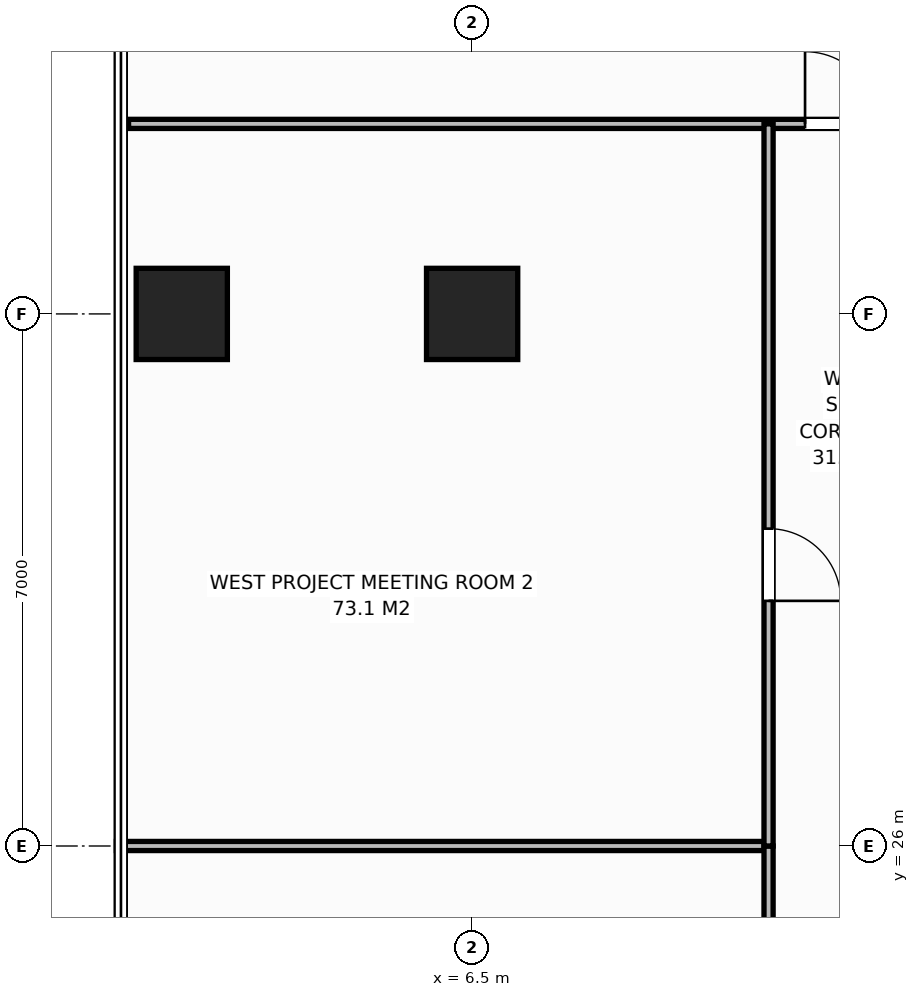
"""IFC4 building model, lengths in metres.
Left out: names, types, materials, properties, quantities, classifications, styles, units other than length and angle.
Written with IfcOpenShell. Run it as: python <this file> out.ifc"""

import sys

from ifc_helpers import new_model, si_unit, direction, frame, frame_2d, origin, origin_2d, place, context, subcontext, project, spatial, rectangle, extrude, element, fill, save


model = new_model("IFC4")
c1 = context("Model", 3, precision=1e-05, world=origin(), true_north=direction((0.0, 1.0)))
c2 = subcontext(c1, "Body", "Model", "MODEL_VIEW")
j1 = project(units=[si_unit("LENGTHUNIT", "METRE"), si_unit("PLANEANGLEUNIT", "RADIAN")], contexts=[c1])
p1 = place(None, origin())
s1 = spatial("IfcSite", under=j1, at=p1, CompositionType="ELEMENT")
p2 = place(p1, origin())
s2 = spatial("IfcBuilding", under=s1, at=p2, CompositionType="ELEMENT")
p3 = place(p2, frame((0.0, 0.0, 105.0)))
s3 = spatial("IfcBuildingStorey", under=s2, at=p3, CompositionType="ELEMENT", Elevation=105.0)
for number, where, z_axis, x_axis in (
    (1, (6.5, 33.0, 0.0), (0.0, 0.0, 1.0), (1.0, 0.0, 0.0)),
    (2, (2.68, 33.0, 0.0), (0.0, 0.0, 1.0), (1.0, 0.0, 0.0)),
):
    element("IfcColumn", number, at=place(p3, frame(where, z_axis=z_axis, x_axis=x_axis)), inside=s3, PredefinedType="COLUMN", context=c2, shape_type="SweptSolid", body=[
        extrude(rectangle(XDim=1.2, YDim=1.2, at=origin_2d()), origin(), (0.0, 0.0, 1.0), 3.8),
    ])
p4 = place(p3, frame((1.98, 35.5, 0.0), z_axis=(0.0, 0.0, 1.0), x_axis=(1.0, 0.0, 0.0)))
e3 = element("IfcWall", 3, at=p4, inside=s3, PredefinedType="PARTITIONING", context=c2, shape_type="SweptSolid", body=[
    extrude(rectangle(XDim=11.16, YDim=0.12, at=frame_2d((5.58, 0.0))), origin(), (0.0, 0.0, 1.0), 3.565),
])
p5 = place(p4, frame((8.9, 0.0, 0.0)))
e4 = element("IfcOpeningElement", 4, at=p5, cuts=e3, PredefinedType="OPENING", context=c2, shape_type="SweptSolid", body=[
    extrude(rectangle(XDim=0.95, YDim=2.15, at=frame_2d((0.475, 1.075))), frame((0.0, 0.07, 0.0), z_axis=(0.0, -1.0, 0.0), x_axis=(1.0, 0.0, 0.0)), (0.0, 0.0, 1.0), 0.14),
])
p6 = place(p3, frame((1.82, 26.0, 0.0), z_axis=(0.0, 0.0, 1.0), x_axis=(1.0, 0.0, 0.0)))
e5 = element("IfcWall", 5, at=p6, inside=s3, PredefinedType="PARTITIONING", context=c2, shape_type="SweptSolid", body=[
    extrude(rectangle(XDim=8.58, YDim=0.12, at=frame_2d((4.29, 0.0))), origin(), (0.0, 0.0, 1.0), 3.565),
])
p7 = place(p3, frame((10.4, 16.5, 0.0), z_axis=(0.0, 0.0, 1.0), x_axis=(0.0, 1.0, 0.0)))
e6 = element("IfcWall", 6, at=p7, inside=s3, PredefinedType="PARTITIONING", context=c2, shape_type="SweptSolid", body=[
    extrude(rectangle(XDim=9.5, YDim=0.12, at=frame_2d((4.75, 0.0))), origin(), (0.0, 0.0, 1.0), 3.565),
])
p8 = place(p7, frame((5.325, 0.0, 0.0)))
e7 = element("IfcOpeningElement", 7, at=p8, cuts=e6, PredefinedType="OPENING", context=c2, shape_type="SweptSolid", body=[
    extrude(rectangle(XDim=0.95, YDim=2.15, at=frame_2d((0.475, 1.075))), frame((0.0, 0.07, 0.0), z_axis=(0.0, -1.0, 0.0), x_axis=(1.0, 0.0, 0.0)), (0.0, 0.0, 1.0), 0.14),
])
p9 = place(p3, frame((10.4, 26.0, 0.0), z_axis=(0.0, 0.0, 1.0), x_axis=(0.0, 1.0, 0.0)))
e8 = element("IfcWall", 8, at=p9, inside=s3, PredefinedType="PARTITIONING", context=c2, shape_type="SweptSolid", body=[
    extrude(rectangle(XDim=9.5, YDim=0.12, at=frame_2d((4.75, 0.0))), origin(), (0.0, 0.0, 1.0), 3.565),
])
p10 = place(p9, frame((3.225, 0.0, 0.0)))
e9 = element("IfcOpeningElement", 9, at=p10, cuts=e8, PredefinedType="OPENING", context=c2, shape_type="SweptSolid", body=[
    extrude(rectangle(XDim=0.95, YDim=2.15, at=frame_2d((0.475, 1.075))), frame((0.0, 0.07, 0.0), z_axis=(0.0, -1.0, 0.0), x_axis=(1.0, 0.0, 0.0)), (0.0, 0.0, 1.0), 0.14),
])
p11 = place(p5, origin())
e10 = element("IfcDoor", 10, at=p11, inside=s3, OperationType="SINGLE_SWING_LEFT", PredefinedType="DOOR", context=c2, shape_type="SweptSolid", body=[
    extrude(rectangle(XDim=0.95, YDim=2.15, at=frame_2d((0.475, 1.075))), frame((0.0, 0.025, 0.0), z_axis=(0.0, -1.0, 0.0), x_axis=(1.0, 0.0, 0.0)), (0.0, 0.0, 1.0), 0.05),
])
fill(e4, e10)
p12 = place(p10, origin())
e11 = element("IfcDoor", 11, at=p12, inside=s3, OperationType="SINGLE_SWING_RIGHT", PredefinedType="DOOR", context=c2, shape_type="SweptSolid", body=[
    extrude(rectangle(XDim=0.95, YDim=2.15, at=frame_2d((0.475, 1.075))), frame((0.0, 0.025, 0.0), z_axis=(0.0, -1.0, 0.0), x_axis=(1.0, 0.0, 0.0)), (0.0, 0.0, 1.0), 0.05),
])
fill(e9, e11)
save(model, sys.argv[1])
